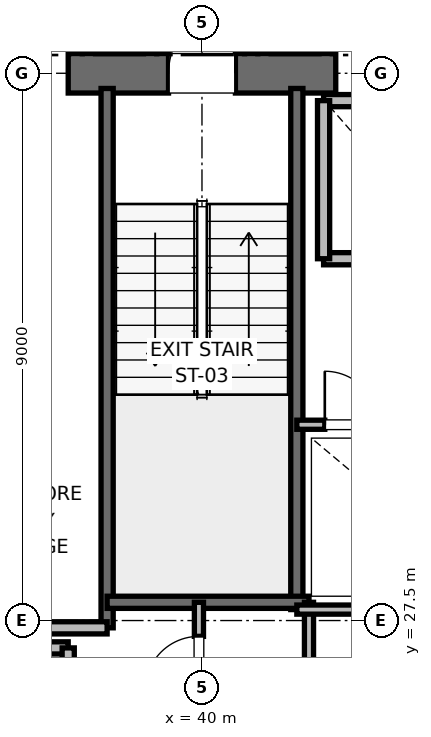
"""IFC4 building model, lengths in metres.
Left out: names, types, materials, properties, quantities, classifications, styles, units other than length and angle.
Written with IfcOpenShell. Run it as: python <this file> out.ifc"""

import sys

from ifc_helpers import new_model, si_unit, direction, frame, frame_2d, origin, place, context, subcontext, project, spatial, rectangle, extrude, element, fill, save


model = new_model("IFC4")
c1 = context("Model", 3, precision=1e-05, world=origin(), true_north=direction((0.0, 1.0)))
c2 = subcontext(c1, "Body", "Model", "MODEL_VIEW")
j1 = project(units=[si_unit("LENGTHUNIT", "METRE"), si_unit("PLANEANGLEUNIT", "RADIAN")], contexts=[c1])
p1 = place(None, origin())
s1 = spatial("IfcSite", under=j1, at=p1, CompositionType="ELEMENT")
p2 = place(p1, origin())
s2 = spatial("IfcBuilding", under=s1, at=p2, CompositionType="ELEMENT")
p3 = place(p2, frame((0.0, 0.0, 35.6)))
s3 = spatial("IfcBuildingStorey", under=s2, at=p3, CompositionType="ELEMENT", Elevation=35.6)
p4 = place(p3, frame((37.8, 36.5, 0.0), z_axis=(0.0, 0.0, 1.0), x_axis=(1.0, 0.0, 0.0)))
e1 = element("IfcWall", 1, at=p4, inside=s3, PredefinedType="SHEAR", context=c2, shape_type="SweptSolid", body=[
    extrude(rectangle(XDim=4.4, YDim=0.65, at=frame_2d((2.2, 0.0))), origin(), (0.0, 0.0, 1.0), 3.76),
])
p5 = place(p4, frame((1.65, 0.0, 0.0)))
e2 = element("IfcOpeningElement", 2, at=p5, cuts=e1, PredefinedType="OPENING", context=c2, shape_type="SweptSolid", body=[
    extrude(rectangle(XDim=1.1, YDim=2.15, at=frame_2d((0.55, 1.075))), frame((0.0, 0.325, 0.0), z_axis=(0.0, -1.0, 0.0), x_axis=(1.0, 0.0, 0.0)), (0.0, 0.0, 1.0), 0.65),
])
p6 = place(p3, frame((38.44, 27.38, 0.0), z_axis=(0.0, 0.0, 1.0), x_axis=(0.0, 1.0, 0.0)))
e3 = element("IfcWall", 3, at=p6, inside=s3, PredefinedType="SOLIDWALL", context=c2, shape_type="SweptSolid", body=[
    extrude(rectangle(XDim=8.87, YDim=0.2, at=frame_2d((4.435, 0.0))), origin(), (0.0, 0.0, 1.0), 3.76),
])
p7 = place(p3, frame((41.56, 27.68, 0.0), z_axis=(0.0, 0.0, 1.0), x_axis=(0.0, 1.0, 0.0)))
e4 = element("IfcWall", 4, at=p7, inside=s3, PredefinedType="SOLIDWALL", context=c2, shape_type="SweptSolid", body=[
    extrude(rectangle(XDim=8.57, YDim=0.2, at=frame_2d((4.285, 0.0))), origin(), (0.0, 0.0, 1.0), 3.76),
])
p8 = place(p3, frame((38.44, 27.8, 0.0), z_axis=(0.0, 0.0, 1.0), x_axis=(1.0, 0.0, 0.0)))
e5 = element("IfcWall", 5, at=p8, inside=s3, PredefinedType="SOLIDWALL", context=c2, shape_type="SweptSolid", body=[
    extrude(rectangle(XDim=3.32, YDim=0.2, at=frame_2d((1.66, 0.0))), origin(), (0.0, 0.0, 1.0), 3.76),
])
p9 = place(p3, frame((32.82, 27.38, 0.0), z_axis=(0.0, 0.0, 1.0), x_axis=(1.0, 0.0, 0.0)))
e6 = element("IfcWall", 6, at=p9, inside=s3, PredefinedType="PARTITIONING", context=c2, shape_type="SweptSolid", body=[
    extrude(rectangle(XDim=5.62, YDim=0.2, at=frame_2d((2.81, 0.0))), origin(), (0.0, 0.0, 1.0), 3.76),
])
p10 = place(p3, frame((37.8, 27.05, 0.0), z_axis=(0.0, 0.0, 1.0), x_axis=(-1.0, 0.0, 0.0)))
e7 = element("IfcWall", 7, at=p10, inside=s3, PredefinedType="SOLIDWALL", context=c2, shape_type="SweptSolid", body=[
    extrude(rectangle(XDim=2.3, YDim=0.2, at=frame_2d((1.15, 0.0))), origin(), (0.0, 0.0, 1.0), 3.76),
])
p11 = place(p3, frame((37.8, 24.45, 0.0), z_axis=(0.0, 0.0, 1.0), x_axis=(0.0, 1.0, 0.0)))
e8 = element("IfcWall", 8, at=p11, inside=s3, PredefinedType="SOLIDWALL", context=c2, shape_type="SweptSolid", body=[
    extrude(rectangle(XDim=2.6, YDim=0.2, at=frame_2d((1.3, 0.0))), origin(), (0.0, 0.0, 1.0), 3.76),
])
p12 = place(p3, frame((42.0, 33.45, 0.0), z_axis=(0.0, 0.0, 1.0), x_axis=(1.0, 0.0, 0.0)))
e9 = element("IfcWall", 9, at=p12, inside=s3, PredefinedType="SOLIDWALL", context=c2, shape_type="SweptSolid", body=[
    extrude(rectangle(XDim=2.3, YDim=0.2, at=frame_2d((1.15, 0.0))), origin(), (0.0, 0.0, 1.0), 3.76),
])
p13 = place(p3, frame((44.3, 36.05, 0.0), z_axis=(0.0, 0.0, 1.0), x_axis=(-1.0, 0.0, 0.0)))
e10 = element("IfcWall", 10, at=p13, inside=s3, PredefinedType="SOLIDWALL", context=c2, shape_type="SweptSolid", body=[
    extrude(rectangle(XDim=2.3, YDim=0.2, at=frame_2d((1.15, 0.0))), origin(), (0.0, 0.0, 1.0), 2.54),
])
p14 = place(p3, frame((42.0, 36.05, 0.0), z_axis=(0.0, 0.0, 1.0), x_axis=(0.0, -1.0, 0.0)))
e11 = element("IfcWall", 11, at=p14, inside=s3, PredefinedType="SOLIDWALL", context=c2, shape_type="SweptSolid", body=[
    extrude(rectangle(XDim=2.6, YDim=0.2, at=frame_2d((1.3, 0.0))), origin(), (0.0, 0.0, 1.0), 2.54),
])
p15 = place(p3, frame((41.76, 23.8, 0.0), z_axis=(0.0, 0.0, 1.0), x_axis=(0.0, 1.0, 0.0)))
e12 = element("IfcWall", 12, at=p15, inside=s3, PredefinedType="PARTITIONING", context=c2, shape_type="SweptSolid", body=[
    extrude(rectangle(XDim=4.0, YDim=0.15, at=frame_2d((2.0, 0.0))), origin(), (0.0, 0.0, 1.0), 2.85),
])
p16 = place(p3, frame((39.95, 25.8, 0.0), z_axis=(0.0, 0.0, 1.0), x_axis=(0.0, 1.0, 0.0)))
e13 = element("IfcWall", 13, at=p16, inside=s3, PredefinedType="PARTITIONING", context=c2, shape_type="SweptSolid", body=[
    extrude(rectangle(XDim=2.0, YDim=0.15, at=frame_2d((1.0, 0.0))), origin(), (0.0, 0.0, 1.0), 2.85),
])
p17 = place(p16, frame((0.56, 0.0, 0.0)))
e14 = element("IfcOpeningElement", 14, at=p17, cuts=e13, PredefinedType="OPENING", context=c2, shape_type="SweptSolid", body=[
    extrude(rectangle(XDim=0.88, YDim=2.1, at=frame_2d((0.44, 1.05))), frame((0.0, 0.075, 0.0), z_axis=(0.0, -1.0, 0.0), x_axis=(1.0, 0.0, 0.0)), (0.0, 0.0, 1.0), 0.15),
])
p18 = place(p3, frame((41.56, 27.68, 0.0), z_axis=(0.0, 0.0, 1.0), x_axis=(1.0, 0.0, 0.0)))
e15 = element("IfcWall", 15, at=p18, inside=s3, PredefinedType="PARTITIONING", context=c2, shape_type="SweptSolid", body=[
    extrude(rectangle(XDim=3.59, YDim=0.15, at=frame_2d((1.795, 0.0))), origin(), (0.0, 0.0, 1.0), 2.85),
])
p19 = place(p3, frame((41.56, 30.72, 0.0), z_axis=(0.0, 0.0, 1.0), x_axis=(1.0, 0.0, 0.0)))
e16 = element("IfcWall", 16, at=p19, inside=s3, PredefinedType="PARTITIONING", context=c2, shape_type="SweptSolid", body=[
    extrude(rectangle(XDim=1.8, YDim=0.15, at=frame_2d((0.9, 0.0))), origin(), (0.0, 0.0, 1.0), 2.85),
])
p20 = place(p19, frame((0.46, 0.0, 0.0)))
e17 = element("IfcOpeningElement", 17, at=p20, cuts=e16, PredefinedType="OPENING", context=c2, shape_type="SweptSolid", body=[
    extrude(rectangle(XDim=0.88, YDim=2.1, at=frame_2d((0.44, 1.05))), frame((0.0, 0.075, 0.0), z_axis=(0.0, -1.0, 0.0), x_axis=(1.0, 0.0, 0.0)), (0.0, 0.0, 1.0), 0.15),
])
p21 = place(p5, origin())
e18 = element("IfcDoor", 18, at=p21, inside=s3, OperationType="SINGLE_SWING_RIGHT", PredefinedType="DOOR", context=c2, shape_type="SweptSolid", body=[
    extrude(rectangle(XDim=1.1, YDim=2.15, at=frame_2d((0.55, 1.075))), frame((0.0, 0.025, 0.0), z_axis=(0.0, -1.0, 0.0), x_axis=(1.0, 0.0, 0.0)), (0.0, 0.0, 1.0), 0.05),
])
fill(e2, e18)
p22 = place(p17, origin())
e19 = element("IfcDoor", 19, at=p22, inside=s3, OperationType="SINGLE_SWING_LEFT", PredefinedType="DOOR", context=c2, shape_type="SweptSolid", body=[
    extrude(rectangle(XDim=0.88, YDim=2.1, at=frame_2d((0.44, 1.05))), frame((0.0, 0.025, 0.0), z_axis=(0.0, -1.0, 0.0), x_axis=(1.0, 0.0, 0.0)), (0.0, 0.0, 1.0), 0.05),
])
fill(e14, e19)
p23 = place(p20, origin())
e20 = element("IfcDoor", 20, at=p23, inside=s3, OperationType="SINGLE_SWING_LEFT", PredefinedType="DOOR", context=c2, shape_type="SweptSolid", body=[
    extrude(rectangle(XDim=0.88, YDim=2.1, at=frame_2d((0.44, 1.05))), frame((0.0, 0.025, 0.0), z_axis=(0.0, -1.0, 0.0), x_axis=(1.0, 0.0, 0.0)), (0.0, 0.0, 1.0), 0.05),
])
fill(e17, e20)
save(model, sys.argv[1])
